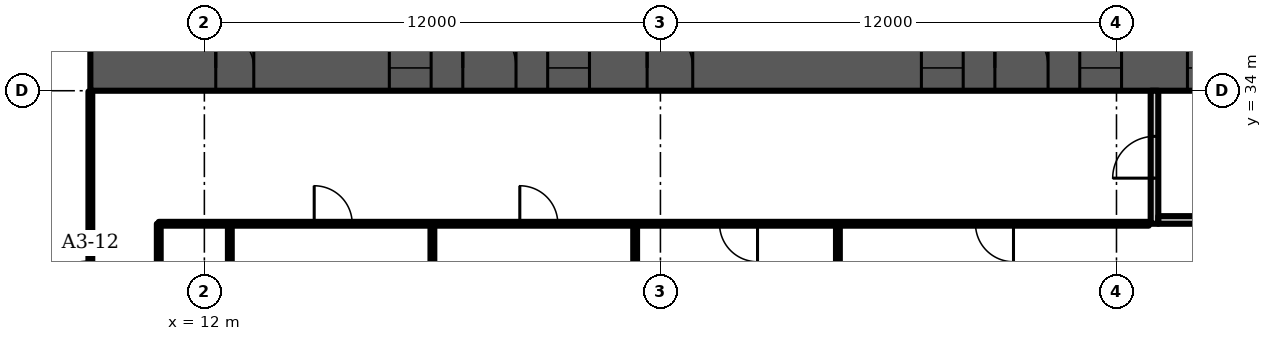
"""IFC4 building model, lengths in metres.
Left out: names, types, materials, properties, quantities, classifications, styles, units other than length and angle.
Written with IfcOpenShell. Run it as: python <this file> out.ifc"""

import sys

from ifc_helpers import new_model, si_unit, direction, frame, frame_2d, origin, place, context, subcontext, project, spatial, rectangle, extrude, element, fill, save


model = new_model("IFC4")
c1 = context("Model", 3, precision=1e-05, world=origin(), true_north=direction((0.0, 1.0)))
c2 = subcontext(c1, "Body", "Model", "MODEL_VIEW")
j1 = project(units=[si_unit("LENGTHUNIT", "METRE"), si_unit("PLANEANGLEUNIT", "RADIAN")], contexts=[c1])
p1 = place(None, origin())
s1 = spatial("IfcSite", under=j1, at=p1, CompositionType="ELEMENT")
p2 = place(p1, origin())
s2 = spatial("IfcBuilding", under=s1, at=p2, CompositionType="ELEMENT")
p3 = place(p2, frame((0.0, 0.0, 63.1)))
s3 = spatial("IfcBuildingStorey", under=s2, at=p3, CompositionType="ELEMENT", Elevation=63.1)
p4 = place(p3, frame((9.0, 34.6, 0.0), z_axis=(0.0, 0.0, 1.0), x_axis=(1.0, 0.0, 0.0)))
e1 = element("IfcWall", 1, at=p4, inside=s3, PredefinedType="SHEAR", context=c2, shape_type="SweptSolid", body=[
    extrude(rectangle(XDim=56.0, YDim=1.2, at=frame_2d((28.0, 0.0))), origin(), (0.0, 0.0, 1.0), 3.6),
])
p5 = place(p4, frame((3.3, 0.0, 0.0)))
e2 = element("IfcOpeningElement", 2, at=p5, cuts=e1, PredefinedType="OPENING", context=c2, shape_type="SweptSolid", body=[
    extrude(rectangle(XDim=1.0, YDim=2.1, at=frame_2d((0.5, 1.05))), frame((0.0, 0.61, 0.0), z_axis=(0.0, -1.0, 0.0), x_axis=(1.0, 0.0, 0.0)), (0.0, 0.0, 1.0), 1.22),
])
p6 = place(p4, frame((7.867, 0.0, 0.0)))
e3 = element("IfcOpeningElement", 3, at=p6, cuts=e1, PredefinedType="OPENING", context=c2, shape_type="SweptSolid", body=[
    extrude(rectangle(XDim=1.1, YDim=2.1, at=frame_2d((0.55, 1.05))), frame((0.0, 0.61, 0.0), z_axis=(0.0, -1.0, 0.0), x_axis=(1.0, 0.0, 0.0)), (0.0, 0.0, 1.0), 1.22),
])
p7 = place(p4, frame((12.033, 0.0, 0.0)))
e4 = element("IfcOpeningElement", 4, at=p7, cuts=e1, PredefinedType="OPENING", context=c2, shape_type="SweptSolid", body=[
    extrude(rectangle(XDim=1.1, YDim=2.1, at=frame_2d((0.55, 1.05))), frame((0.0, 0.61, 0.0), z_axis=(0.0, -1.0, 0.0), x_axis=(1.0, 0.0, 0.0)), (0.0, 0.0, 1.0), 1.22),
])
p8 = place(p4, frame((9.8, 0.0, 0.0)))
e5 = element("IfcOpeningElement", 5, at=p8, cuts=e1, PredefinedType="OPENING", context=c2, shape_type="SweptSolid", body=[
    extrude(rectangle(XDim=1.4, YDim=2.1, at=frame_2d((0.7, 1.05))), frame((0.0, 0.61, 0.0), z_axis=(0.0, -1.0, 0.0), x_axis=(1.0, 0.0, 0.0)), (0.0, 0.0, 1.0), 1.22),
])
p9 = place(p4, frame((14.65, 0.0, 0.0)))
e6 = element("IfcOpeningElement", 6, at=p9, cuts=e1, PredefinedType="OPENING", context=c2, shape_type="SweptSolid", body=[
    extrude(rectangle(XDim=1.2, YDim=2.1, at=frame_2d((0.6, 1.05))), frame((0.0, 0.61, 0.0), z_axis=(0.0, -1.0, 0.0), x_axis=(1.0, 0.0, 0.0)), (0.0, 0.0, 1.0), 1.22),
])
p10 = place(p4, frame((21.867, 0.0, 0.0)))
e7 = element("IfcOpeningElement", 7, at=p10, cuts=e1, PredefinedType="OPENING", context=c2, shape_type="SweptSolid", body=[
    extrude(rectangle(XDim=1.1, YDim=2.1, at=frame_2d((0.55, 1.05))), frame((0.0, 0.61, 0.0), z_axis=(0.0, -1.0, 0.0), x_axis=(1.0, 0.0, 0.0)), (0.0, 0.0, 1.0), 1.22),
])
p11 = place(p4, frame((26.033, 0.0, 0.0)))
e8 = element("IfcOpeningElement", 8, at=p11, cuts=e1, PredefinedType="OPENING", context=c2, shape_type="SweptSolid", body=[
    extrude(rectangle(XDim=1.1, YDim=2.1, at=frame_2d((0.55, 1.05))), frame((0.0, 0.61, 0.0), z_axis=(0.0, -1.0, 0.0), x_axis=(1.0, 0.0, 0.0)), (0.0, 0.0, 1.0), 1.22),
])
p12 = place(p4, frame((23.8, 0.0, 0.0)))
e9 = element("IfcOpeningElement", 9, at=p12, cuts=e1, PredefinedType="OPENING", context=c2, shape_type="SweptSolid", body=[
    extrude(rectangle(XDim=1.4, YDim=2.1, at=frame_2d((0.7, 1.05))), frame((0.0, 0.61, 0.0), z_axis=(0.0, -1.0, 0.0), x_axis=(1.0, 0.0, 0.0)), (0.0, 0.0, 1.0), 1.22),
])
p13 = place(p4, frame((28.867, 0.0, 0.0)))
e10 = element("IfcOpeningElement", 10, at=p13, cuts=e1, PredefinedType="OPENING", context=c2, shape_type="SweptSolid", body=[
    extrude(rectangle(XDim=1.1, YDim=2.1, at=frame_2d((0.55, 1.05))), frame((0.0, 0.61, 0.0), z_axis=(0.0, -1.0, 0.0), x_axis=(1.0, 0.0, 0.0)), (0.0, 0.0, 1.0), 1.22),
])
p14 = place(p4, frame((33.033, 0.0, 0.0)))
e11 = element("IfcOpeningElement", 11, at=p14, cuts=e1, PredefinedType="OPENING", context=c2, shape_type="SweptSolid", body=[
    extrude(rectangle(XDim=1.1, YDim=2.1, at=frame_2d((0.55, 1.05))), frame((0.0, 0.61, 0.0), z_axis=(0.0, -1.0, 0.0), x_axis=(1.0, 0.0, 0.0)), (0.0, 0.0, 1.0), 1.22),
])
p15 = place(p4, frame((40.15, 0.0, 0.0)))
e12 = element("IfcOpeningElement", 12, at=p15, cuts=e1, PredefinedType="OPENING", context=c2, shape_type="SweptSolid", body=[
    extrude(rectangle(XDim=1.2, YDim=2.1, at=frame_2d((0.6, 1.05))), frame((0.0, 0.61, 0.0), z_axis=(0.0, -1.0, 0.0), x_axis=(1.0, 0.0, 0.0)), (0.0, 0.0, 1.0), 1.22),
])
p16 = place(p4, frame((44.8, 0.0, 0.0)))
e13 = element("IfcOpeningElement", 13, at=p16, cuts=e1, PredefinedType="OPENING", context=c2, shape_type="SweptSolid", body=[
    extrude(rectangle(XDim=1.4, YDim=2.1, at=frame_2d((0.7, 1.05))), frame((0.0, 0.61, 0.0), z_axis=(0.0, -1.0, 0.0), x_axis=(1.0, 0.0, 0.0)), (0.0, 0.0, 1.0), 1.22),
])
p17 = place(p4, frame((49.867, 0.0, 0.0)))
e14 = element("IfcOpeningElement", 14, at=p17, cuts=e1, PredefinedType="OPENING", context=c2, shape_type="SweptSolid", body=[
    extrude(rectangle(XDim=1.1, YDim=2.1, at=frame_2d((0.55, 1.05))), frame((0.0, 0.61, 0.0), z_axis=(0.0, -1.0, 0.0), x_axis=(1.0, 0.0, 0.0)), (0.0, 0.0, 1.0), 1.22),
])
p18 = place(p4, frame((53.5, 0.0, 0.0)))
e15 = element("IfcOpeningElement", 15, at=p18, cuts=e1, PredefinedType="OPENING", context=c2, shape_type="SweptSolid", body=[
    extrude(rectangle(XDim=1.1, YDim=2.1, at=frame_2d((0.55, 1.05))), frame((0.0, 0.61, 0.0), z_axis=(0.0, -1.0, 0.0), x_axis=(1.0, 0.0, 0.0)), (0.0, 0.0, 1.0), 1.22),
])
p19 = place(p4, frame((51.567, 0.0, 0.0)))
e16 = element("IfcOpeningElement", 16, at=p19, cuts=e1, PredefinedType="OPENING", context=c2, shape_type="SweptSolid", body=[
    extrude(rectangle(XDim=1.4, YDim=2.1, at=frame_2d((0.7, 1.05))), frame((0.0, 0.61, 0.0), z_axis=(0.0, -1.0, 0.0), x_axis=(1.0, 0.0, 0.0)), (0.0, 0.0, 1.0), 1.22),
])
p20 = place(p3, frame((37.0, 30.5, 0.0), z_axis=(0.0, 0.0, 1.0), x_axis=(0.0, 1.0, 0.0)))
e17 = element("IfcWall", 17, at=p20, inside=s3, PredefinedType="PARTITIONING", context=c2, shape_type="SweptSolid", body=[
    extrude(rectangle(XDim=3.5, YDim=0.2, at=frame_2d((1.75, 0.0))), origin(), (0.0, 0.0, 1.0), 3.2),
])
p21 = place(p20, frame((1.2, 0.0, 0.0)))
e18 = element("IfcOpeningElement", 18, at=p21, cuts=e17, PredefinedType="OPENING", context=c2, shape_type="SweptSolid", body=[
    extrude(rectangle(XDim=1.1, YDim=2.1, at=frame_2d((0.55, 1.05))), frame((0.0, 0.11, 0.0), z_axis=(0.0, -1.0, 0.0), x_axis=(1.0, 0.0, 0.0)), (0.0, 0.0, 1.0), 0.22),
])
p22 = place(p3, frame((37.1, 30.6, 0.0), z_axis=(0.0, 0.0, 1.0), x_axis=(1.0, 0.0, 0.0)))
e19 = element("IfcWall", 19, at=p22, inside=s3, PredefinedType="PARTITIONING", context=c2, shape_type="SweptSolid", body=[
    extrude(rectangle(XDim=2.8, YDim=0.2, at=frame_2d((1.4, 0.0))), origin(), (0.0, 0.0, 1.0), 3.2),
])
p23 = place(p3, frame((9.0, 26.02, 0.0), z_axis=(0.0, 0.0, 1.0), x_axis=(0.0, 1.0, 0.0)))
e20 = element("IfcWall", 20, at=p23, inside=s3, PredefinedType="PARTITIONING", context=c2, shape_type="SweptSolid", body=[
    extrude(rectangle(XDim=7.96, YDim=0.1, at=frame_2d((3.98, 0.0))), origin(), (0.0, 0.0, 1.0), 3.2),
])
p24 = place(p23, frame((1.7, 0.0, 0.0)))
e21 = element("IfcOpeningElement", 21, at=p24, cuts=e20, PredefinedType="OPENING", context=c2, shape_type="SweptSolid", body=[
    extrude(rectangle(XDim=1.8, YDim=2.1, at=frame_2d((0.9, 1.05))), frame((0.0, 0.06, 0.0), z_axis=(0.0, -1.0, 0.0), x_axis=(1.0, 0.0, 0.0)), (0.0, 0.0, 1.0), 0.12),
])
p25 = place(p3, frame((10.8, 21.35, 0.0), z_axis=(0.0, 0.0, 1.0), x_axis=(0.0, 1.0, 0.0)))
e22 = element("IfcWall", 22, at=p25, inside=s3, PredefinedType="PARTITIONING", context=c2, shape_type="SweptSolid", body=[
    extrude(rectangle(XDim=9.15, YDim=0.1, at=frame_2d((4.575, 0.0))), origin(), (0.0, 0.0, 1.0), 3.2),
])
p26 = place(p25, frame((3.62, 0.0, 0.0)))
e23 = element("IfcOpeningElement", 23, at=p26, cuts=e22, PredefinedType="OPENING", context=c2, shape_type="SweptSolid", body=[
    extrude(rectangle(XDim=1.8, YDim=2.1, at=frame_2d((0.9, 1.05))), frame((0.0, 0.06, 0.0), z_axis=(0.0, -1.0, 0.0), x_axis=(1.0, 0.0, 0.0)), (0.0, 0.0, 1.0), 0.12),
])
p27 = place(p3, frame((10.8, 30.5, 0.0), z_axis=(0.0, 0.0, 1.0), x_axis=(1.0, 0.0, 0.0)))
e24 = element("IfcWall", 24, at=p27, inside=s3, PredefinedType="PARTITIONING", context=c2, shape_type="SweptSolid", body=[
    extrude(rectangle(XDim=26.05, YDim=0.1, at=frame_2d((13.025, 0.0))), origin(), (0.0, 0.0, 1.0), 3.2),
])
p28 = place(p27, frame((4.09, 0.0, 0.0)))
e25 = element("IfcOpeningElement", 25, at=p28, cuts=e24, PredefinedType="OPENING", context=c2, shape_type="SweptSolid", body=[
    extrude(rectangle(XDim=1.0, YDim=2.1, at=frame_2d((0.5, 1.05))), frame((0.0, 0.06, 0.0), z_axis=(0.0, -1.0, 0.0), x_axis=(1.0, 0.0, 0.0)), (0.0, 0.0, 1.0), 0.12),
])
p29 = place(p27, frame((9.5, 0.0, 0.0)))
e26 = element("IfcOpeningElement", 26, at=p29, cuts=e24, PredefinedType="OPENING", context=c2, shape_type="SweptSolid", body=[
    extrude(rectangle(XDim=1.0, YDim=2.1, at=frame_2d((0.5, 1.05))), frame((0.0, 0.06, 0.0), z_axis=(0.0, -1.0, 0.0), x_axis=(1.0, 0.0, 0.0)), (0.0, 0.0, 1.0), 0.12),
])
p30 = place(p27, frame((14.755, 0.0, 0.0)))
e27 = element("IfcOpeningElement", 27, at=p30, cuts=e24, PredefinedType="OPENING", context=c2, shape_type="SweptSolid", body=[
    extrude(rectangle(XDim=1.0, YDim=2.1, at=frame_2d((0.5, 1.05))), frame((0.0, 0.06, 0.0), z_axis=(0.0, -1.0, 0.0), x_axis=(1.0, 0.0, 0.0)), (0.0, 0.0, 1.0), 0.12),
])
p31 = place(p27, frame((21.49, 0.0, 0.0)))
e28 = element("IfcOpeningElement", 28, at=p31, cuts=e24, PredefinedType="OPENING", context=c2, shape_type="SweptSolid", body=[
    extrude(rectangle(XDim=1.0, YDim=2.1, at=frame_2d((0.5, 1.05))), frame((0.0, 0.06, 0.0), z_axis=(0.0, -1.0, 0.0), x_axis=(1.0, 0.0, 0.0)), (0.0, 0.0, 1.0), 0.12),
])
p32 = place(p3, frame((12.67, -1.088, 0.0), z_axis=(0.0, 0.0, 1.0), x_axis=(0.0, 1.0, 0.0)))
e29 = element("IfcWall", 29, at=p32, inside=s3, PredefinedType="PARTITIONING", context=c2, shape_type="SweptSolid", body=[
    extrude(rectangle(XDim=31.588, YDim=0.1, at=frame_2d((15.794, 0.0))), origin(), (0.0, 0.0, 1.0), 3.2),
])
p33 = place(p3, frame((18.0, -0.94, 0.0), z_axis=(0.0, 0.0, 1.0), x_axis=(0.0, 1.0, 0.0)))
e30 = element("IfcWall", 30, at=p33, inside=s3, PredefinedType="PARTITIONING", context=c2, shape_type="SweptSolid", body=[
    extrude(rectangle(XDim=31.44, YDim=0.1, at=frame_2d((15.72, 0.0))), origin(), (0.0, 0.0, 1.0), 3.2),
])
p34 = place(p3, frame((23.335, -1.41, 0.0), z_axis=(0.0, 0.0, 1.0), x_axis=(0.0, 1.0, 0.0)))
e31 = element("IfcWall", 31, at=p34, inside=s3, PredefinedType="PARTITIONING", context=c2, shape_type="SweptSolid", body=[
    extrude(rectangle(XDim=31.91, YDim=0.1, at=frame_2d((15.955, 0.0))), origin(), (0.0, 0.0, 1.0), 3.2),
])
p35 = place(p3, frame((28.67, -1.875, 0.0), z_axis=(0.0, 0.0, 1.0), x_axis=(0.0, 1.0, 0.0)))
e32 = element("IfcWall", 32, at=p35, inside=s3, PredefinedType="PARTITIONING", context=c2, shape_type="SweptSolid", body=[
    extrude(rectangle(XDim=32.375, YDim=0.1, at=frame_2d((16.188, 0.0))), origin(), (0.0, 0.0, 1.0), 3.2),
])
p36 = place(p5, origin())
e33 = element("IfcDoor", 33, at=p36, inside=s3, OperationType="SINGLE_SWING_LEFT", PredefinedType="DOOR", context=c2, shape_type="SweptSolid", body=[
    extrude(rectangle(XDim=1.0, YDim=2.1, at=frame_2d((0.5, 1.05))), frame((0.0, 0.6, 0.0), z_axis=(0.0, -1.0, 0.0), x_axis=(1.0, 0.0, 0.0)), (0.0, 0.0, 1.0), 1.199),
])
fill(e2, e33)
p37 = place(p6, origin())
e34 = element("IfcDoor", 34, at=p37, inside=s3, OperationType="DOUBLE_DOOR_SLIDING", PredefinedType="DOOR", context=c2, shape_type="SweptSolid", body=[
    extrude(rectangle(XDim=1.1, YDim=2.1, at=frame_2d((0.55, 1.05))), frame((0.0, 0.025, 0.0), z_axis=(0.0, -1.0, 0.0), x_axis=(1.0, 0.0, 0.0)), (0.0, 0.0, 1.0), 0.05),
])
fill(e3, e34)
p38 = place(p7, origin())
e35 = element("IfcDoor", 35, at=p38, inside=s3, OperationType="DOUBLE_DOOR_SLIDING", PredefinedType="DOOR", context=c2, shape_type="SweptSolid", body=[
    extrude(rectangle(XDim=1.1, YDim=2.1, at=frame_2d((0.55, 1.05))), frame((0.0, 0.025, 0.0), z_axis=(0.0, -1.0, 0.0), x_axis=(1.0, 0.0, 0.0)), (0.0, 0.0, 1.0), 0.05),
])
fill(e4, e35)
p39 = place(p8, origin())
e36 = element("IfcDoor", 36, at=p39, inside=s3, OperationType="DOUBLE_DOOR_SINGLE_SWING", PredefinedType="DOOR", context=c2, shape_type="SweptSolid", body=[
    extrude(rectangle(XDim=1.4, YDim=2.1, at=frame_2d((0.7, 1.05))), frame((0.0, 0.025, 0.0), z_axis=(0.0, -1.0, 0.0), x_axis=(1.0, 0.0, 0.0)), (0.0, 0.0, 1.0), 0.05),
])
fill(e5, e36)
p40 = place(p9, origin())
e37 = element("IfcDoor", 37, at=p40, inside=s3, OperationType="SINGLE_SWING_LEFT", PredefinedType="DOOR", context=c2, shape_type="SweptSolid", body=[
    extrude(rectangle(XDim=1.2, YDim=2.1, at=frame_2d((0.6, 1.05))), frame((0.0, 0.025, 0.0), z_axis=(0.0, -1.0, 0.0), x_axis=(1.0, 0.0, 0.0)), (0.0, 0.0, 1.0), 0.05),
])
fill(e6, e37)
p41 = place(p10, origin())
e38 = element("IfcDoor", 38, at=p41, inside=s3, OperationType="DOUBLE_DOOR_SLIDING", PredefinedType="DOOR", context=c2, shape_type="SweptSolid", body=[
    extrude(rectangle(XDim=1.1, YDim=2.1, at=frame_2d((0.55, 1.05))), frame((0.0, 0.025, 0.0), z_axis=(0.0, -1.0, 0.0), x_axis=(1.0, 0.0, 0.0)), (0.0, 0.0, 1.0), 0.05),
])
fill(e7, e38)
p42 = place(p11, origin())
e39 = element("IfcDoor", 39, at=p42, inside=s3, OperationType="DOUBLE_DOOR_SLIDING", PredefinedType="DOOR", context=c2, shape_type="SweptSolid", body=[
    extrude(rectangle(XDim=1.1, YDim=2.1, at=frame_2d((0.55, 1.05))), frame((0.0, 0.025, 0.0), z_axis=(0.0, -1.0, 0.0), x_axis=(1.0, 0.0, 0.0)), (0.0, 0.0, 1.0), 0.05),
])
fill(e8, e39)
p43 = place(p12, origin())
e40 = element("IfcDoor", 40, at=p43, inside=s3, OperationType="DOUBLE_DOOR_SINGLE_SWING", PredefinedType="DOOR", context=c2, shape_type="SweptSolid", body=[
    extrude(rectangle(XDim=1.4, YDim=2.1, at=frame_2d((0.7, 1.05))), frame((0.0, 0.025, 0.0), z_axis=(0.0, -1.0, 0.0), x_axis=(1.0, 0.0, 0.0)), (0.0, 0.0, 1.0), 0.05),
])
fill(e9, e40)
p44 = place(p13, origin())
e41 = element("IfcDoor", 41, at=p44, inside=s3, OperationType="DOUBLE_DOOR_SLIDING", PredefinedType="DOOR", context=c2, shape_type="SweptSolid", body=[
    extrude(rectangle(XDim=1.1, YDim=2.1, at=frame_2d((0.55, 1.05))), frame((0.0, 0.025, 0.0), z_axis=(0.0, -1.0, 0.0), x_axis=(1.0, 0.0, 0.0)), (0.0, 0.0, 1.0), 0.05),
])
fill(e10, e41)
p45 = place(p21, origin())
e42 = element("IfcDoor", 42, at=p45, inside=s3, OperationType="SINGLE_SWING_LEFT", PredefinedType="DOOR", context=c2, shape_type="SweptSolid", body=[
    extrude(rectangle(XDim=1.1, YDim=2.1, at=frame_2d((0.55, 1.05))), frame((0.0, 0.025, 0.0), z_axis=(0.0, -1.0, 0.0), x_axis=(1.0, 0.0, 0.0)), (0.0, 0.0, 1.0), 0.05),
])
fill(e18, e42)
p46 = place(p24, origin())
e43 = element("IfcDoor", 43, at=p46, inside=s3, OperationType="DOUBLE_DOOR_SINGLE_SWING", PredefinedType="DOOR", context=c2, shape_type="SweptSolid", body=[
    extrude(rectangle(XDim=1.8, YDim=2.1, at=frame_2d((0.9, 1.05))), frame((0.0, 0.025, 0.0), z_axis=(0.0, -1.0, 0.0), x_axis=(1.0, 0.0, 0.0)), (0.0, 0.0, 1.0), 0.05),
])
fill(e21, e43)
p47 = place(p28, origin())
e44 = element("IfcDoor", 44, at=p47, inside=s3, OperationType="SINGLE_SWING_LEFT", PredefinedType="DOOR", context=c2, shape_type="SweptSolid", body=[
    extrude(rectangle(XDim=1.0, YDim=2.1, at=frame_2d((0.5, 1.05))), frame((0.0, 0.025, 0.0), z_axis=(0.0, -1.0, 0.0), x_axis=(1.0, 0.0, 0.0)), (0.0, 0.0, 1.0), 0.05),
])
fill(e25, e44)
p48 = place(p29, origin())
e45 = element("IfcDoor", 45, at=p48, inside=s3, OperationType="SINGLE_SWING_LEFT", PredefinedType="DOOR", context=c2, shape_type="SweptSolid", body=[
    extrude(rectangle(XDim=1.0, YDim=2.1, at=frame_2d((0.5, 1.05))), frame((0.0, 0.025, 0.0), z_axis=(0.0, -1.0, 0.0), x_axis=(1.0, 0.0, 0.0)), (0.0, 0.0, 1.0), 0.05),
])
fill(e26, e45)
p49 = place(p30, origin())
e46 = element("IfcDoor", 46, at=p49, inside=s3, OperationType="SINGLE_SWING_RIGHT", PredefinedType="DOOR", context=c2, shape_type="SweptSolid", body=[
    extrude(rectangle(XDim=1.0, YDim=2.1, at=frame_2d((0.5, 1.05))), frame((0.0, 0.025, 0.0), z_axis=(0.0, -1.0, 0.0), x_axis=(1.0, 0.0, 0.0)), (0.0, 0.0, 1.0), 0.05),
])
fill(e27, e46)
p50 = place(p31, origin())
e47 = element("IfcDoor", 47, at=p50, inside=s3, OperationType="SINGLE_SWING_RIGHT", PredefinedType="DOOR", context=c2, shape_type="SweptSolid", body=[
    extrude(rectangle(XDim=1.0, YDim=2.1, at=frame_2d((0.5, 1.05))), frame((0.0, 0.025, 0.0), z_axis=(0.0, -1.0, 0.0), x_axis=(1.0, 0.0, 0.0)), (0.0, 0.0, 1.0), 0.05),
])
fill(e28, e47)
save(model, sys.argv[1])
